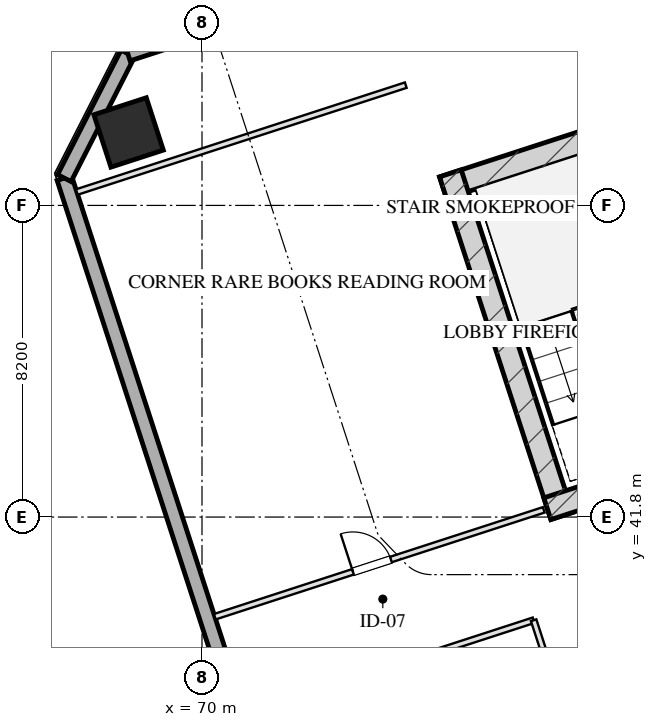
"""IFC4 building model, lengths in metres.
Left out: names, types, materials, properties, quantities, classifications, styles, units other than length and angle.
Written with IfcOpenShell. Run it as: python <this file> out.ifc"""

import sys

from ifc_helpers import new_model, si_unit, direction, frame, frame_2d, origin, origin_2d, place, context, subcontext, project, spatial, rectangle, hollow_rectangle, extrude, element, fill, save


model = new_model("IFC4")
c1 = context("Model", 3, precision=1e-05, world=origin(), true_north=direction((0.0, 1.0)))
c2 = subcontext(c1, "Body", "Model", "MODEL_VIEW")
j1 = project(units=[si_unit("LENGTHUNIT", "METRE"), si_unit("PLANEANGLEUNIT", "RADIAN")], contexts=[c1])
p1 = place(None, origin())
s1 = spatial("IfcSite", under=j1, at=p1, CompositionType="ELEMENT")
p2 = place(p1, origin())
s2 = spatial("IfcBuilding", under=s1, at=p2, CompositionType="ELEMENT")
p3 = place(p2, frame((0.0, 0.0, 96.6)))
s3 = spatial("IfcBuildingStorey", under=s2, at=p3, CompositionType="ELEMENT", Elevation=96.6)
p4 = place(p3, frame((76.344, 50.466, 0.0), z_axis=(0.0, 0.0, 1.0), x_axis=(0.951055727519, 0.309019421968, 0.0)))
e1 = element("IfcWall", 1, at=p4, inside=s3, PredefinedType="SHEAR", context=c2, shape_type="SweptSolid", body=[
    extrude(rectangle(XDim=16.4, YDim=0.6, at=frame_2d((8.2, 0.0))), origin(), (0.0, 0.0, 1.0), 3.45),
])
p5 = place(p3, frame((79.466, 41.828, 0.0), z_axis=(0.0, 0.0, 1.0), x_axis=(-0.309041232772, 0.951048640421, 0.0)))
e2 = element("IfcWall", 2, at=p5, inside=s3, PredefinedType="SHEAR", context=c2, shape_type="SweptSolid", body=[
    extrude(rectangle(XDim=9.48, YDim=0.6, at=frame_2d((4.74, 0.0))), origin(), (0.0, 0.0, 1.0), 3.45),
])
p6 = place(p3, frame((79.087, 42.021, 0.0), z_axis=(0.0, 0.0, 1.0), x_axis=(0.951062550203, 0.3089984233, 0.0)))
e3 = element("IfcWall", 3, at=p6, inside=s3, PredefinedType="SHEAR", context=c2, shape_type="SweptSolid", body=[
    extrude(rectangle(XDim=4.22, YDim=0.6, at=frame_2d((2.11, 0.0))), origin(), (0.0, 0.0, 1.0), 3.45),
])
p7 = place(p3, frame((68.069, 51.92, 0.0), z_axis=(0.0, 0.0, 1.0), x_axis=(0.951056516295, 0.309016994375, 0.0)))
e4 = element("IfcColumn", 4, at=p7, inside=s3, PredefinedType="COLUMN", context=c2, shape_type="SweptSolid", body=[
    extrude(hollow_rectangle(XDim=1.45, YDim=1.45, WallThickness=0.05, at=origin_2d()), origin(), (0.0, 0.0, 1.0), 3.451),
])
p8 = place(p3, frame((80.716, 6.59, 0.0), z_axis=(0.0, 0.0, 1.0), x_axis=(-0.309017542002, 0.95105633836, 0.0)))
e5 = element("IfcWall", 5, at=p8, inside=s3, PredefinedType="SOLIDWALL", context=c2, shape_type="SweptSolid", body=[
    extrude(rectangle(XDim=46.4, YDim=0.4, at=frame_2d((23.2, 0.0))), origin(), (0.0, 0.0, 1.0), 2.55),
])
p9 = place(p8, frame((15.6, 0.0, 0.75)))
e6 = element("IfcOpeningElement", 6, at=p9, cuts=e5, PredefinedType="OPENING", context=c2, shape_type="SweptSolid", body=[
    extrude(rectangle(XDim=2.4, YDim=1.4, at=frame_2d((1.2, 0.7))), frame((0.0, 0.21, 0.0), z_axis=(0.0, -1.0, 0.0), x_axis=(1.0, 0.0, 0.0)), (0.0, 0.0, 1.0), 0.42),
])
p10 = place(p8, frame((19.4, 0.0, 0.75)))
e7 = element("IfcOpeningElement", 7, at=p10, cuts=e5, PredefinedType="OPENING", context=c2, shape_type="SweptSolid", body=[
    extrude(rectangle(XDim=2.4, YDim=1.4, at=frame_2d((1.2, 0.7))), frame((0.0, 0.21, 0.0), z_axis=(0.0, -1.0, 0.0), x_axis=(1.0, 0.0, 0.0)), (0.0, 0.0, 1.0), 0.42),
])
p11 = place(p8, frame((24.6, 0.0, 0.75)))
e8 = element("IfcOpeningElement", 8, at=p11, cuts=e5, PredefinedType="OPENING", context=c2, shape_type="SweptSolid", body=[
    extrude(rectangle(XDim=2.4, YDim=1.4, at=frame_2d((1.2, 0.7))), frame((0.0, 0.21, 0.0), z_axis=(0.0, -1.0, 0.0), x_axis=(1.0, 0.0, 0.0)), (0.0, 0.0, 1.0), 0.42),
])
p12 = place(p8, frame((28.4, 0.0, 0.75)))
e9 = element("IfcOpeningElement", 9, at=p12, cuts=e5, PredefinedType="OPENING", context=c2, shape_type="SweptSolid", body=[
    extrude(rectangle(XDim=2.4, YDim=1.4, at=frame_2d((1.2, 0.7))), frame((0.0, 0.21, 0.0), z_axis=(0.0, -1.0, 0.0), x_axis=(1.0, 0.0, 0.0)), (0.0, 0.0, 1.0), 0.42),
])
p13 = place(p3, frame((66.377, 50.719, 0.0), z_axis=(0.0, 0.0, 1.0), x_axis=(0.454026238093, 0.890988313685, 0.0)))
e10 = element("IfcWall", 10, at=p13, inside=s3, PredefinedType="SOLIDWALL", context=c2, shape_type="SweptSolid", body=[
    extrude(rectangle(XDim=3.677, YDim=0.4, at=frame_2d((1.838, 0.0))), origin(), (0.0, 0.0, 1.0), 2.55),
])
p14 = place(p3, frame((68.047, 53.995, 0.0), z_axis=(0.0, 0.0, 1.0), x_axis=(0.95105505922, 0.309021478754, 0.0)))
e11 = element("IfcWall", 11, at=p14, inside=s3, PredefinedType="SOLIDWALL", context=c2, shape_type="SweptSolid", body=[
    extrude(rectangle(XDim=29.4, YDim=0.4, at=frame_2d((14.7, 0.0))), origin(), (0.0, 0.0, 1.0), 2.55),
])
p15 = place(p3, frame((66.707, 50.352, 0.0), z_axis=(0.0, 0.0, 1.0), x_axis=(0.951057133767, 0.309015093986, 0.0)))
e12 = element("IfcWall", 12, at=p15, inside=s3, PredefinedType="PARTITIONING", context=c2, shape_type="SweptSolid", body=[
    extrude(rectangle(XDim=9.1, YDim=0.15, at=frame_2d((4.55, 0.0))), origin(), (0.0, 0.0, 1.0), 3.155),
])
p16 = place(p3, frame((70.338, 39.177, 0.0), z_axis=(0.0, 0.0, 1.0), x_axis=(0.951059695568, 0.309007209409, 0.0)))
e13 = element("IfcWall", 13, at=p16, inside=s3, PredefinedType="PARTITIONING", context=c2, shape_type="SweptSolid", body=[
    extrude(rectangle(XDim=9.1, YDim=0.15, at=frame_2d((4.55, 0.0))), origin(), (0.0, 0.0, 1.0), 3.155),
])
p17 = place(p16, frame((3.822, 0.0, 0.0)))
e14 = element("IfcOpeningElement", 14, at=p17, cuts=e13, PredefinedType="OPENING", context=c2, shape_type="SweptSolid", body=[
    extrude(rectangle(XDim=1.05, YDim=2.05, at=frame_2d((0.525, 1.025))), frame((0.0, 0.085, 0.0), z_axis=(0.0, -1.0, 0.0), x_axis=(1.0, 0.0, 0.0)), (0.0, 0.0, 1.0), 0.17),
])
p18 = place(p3, frame((71.166, 36.629, 0.0), z_axis=(0.0, 0.0, 1.0), x_axis=(0.951060470027, 0.309004825775, 0.0)))
e15 = element("IfcWall", 15, at=p18, inside=s3, PredefinedType="PARTITIONING", context=c2, shape_type="SweptSolid", body=[
    extrude(rectangle(XDim=7.95, YDim=0.15, at=frame_2d((3.975, 0.0))), origin(), (0.0, 0.0, 1.0), 3.155),
])
p19 = place(p3, frame((83.869, 23.26, 0.0), z_axis=(0.0, 0.0, 1.0), x_axis=(-0.309022042254, 0.951054876125, 0.0)))
e16 = element("IfcWall", 16, at=p19, inside=s3, PredefinedType="PARTITIONING", context=c2, shape_type="SweptSolid", body=[
    extrude(rectangle(XDim=16.64, YDim=0.15, at=frame_2d((8.32, 0.0))), origin(), (0.0, 0.0, 1.0), 3.155),
])
p20 = place(p19, frame((1.58, 0.0, 0.0)))
e17 = element("IfcOpeningElement", 17, at=p20, cuts=e16, PredefinedType="OPENING", context=c2, shape_type="SweptSolid", body=[
    extrude(rectangle(XDim=1.0, YDim=2.05, at=frame_2d((0.5, 1.025))), frame((0.0, 0.085, 0.0), z_axis=(0.0, -1.0, 0.0), x_axis=(1.0, 0.0, 0.0)), (0.0, 0.0, 1.0), 0.17),
])
p21 = place(p19, frame((6.08, 0.0, 0.0)))
e18 = element("IfcOpeningElement", 18, at=p21, cuts=e16, PredefinedType="OPENING", context=c2, shape_type="SweptSolid", body=[
    extrude(rectangle(XDim=1.0, YDim=2.05, at=frame_2d((0.5, 1.025))), frame((0.0, 0.085, 0.0), z_axis=(0.0, -1.0, 0.0), x_axis=(1.0, 0.0, 0.0)), (0.0, 0.0, 1.0), 0.17),
])
p22 = place(p19, frame((10.406, 0.0, 0.0)))
e19 = element("IfcOpeningElement", 19, at=p22, cuts=e16, PredefinedType="OPENING", context=c2, shape_type="SweptSolid", body=[
    extrude(rectangle(XDim=1.0, YDim=2.05, at=frame_2d((0.5, 1.025))), frame((0.0, 0.085, 0.0), z_axis=(0.0, -1.0, 0.0), x_axis=(1.0, 0.0, 0.0)), (0.0, 0.0, 1.0), 0.17),
])
p23 = place(p19, frame((14.226, 0.0, 0.0)))
e20 = element("IfcOpeningElement", 20, at=p23, cuts=e16, PredefinedType="OPENING", context=c2, shape_type="SweptSolid", body=[
    extrude(rectangle(XDim=1.0, YDim=2.05, at=frame_2d((0.5, 1.025))), frame((0.0, 0.085, 0.0), z_axis=(0.0, -1.0, 0.0), x_axis=(1.0, 0.0, 0.0)), (0.0, 0.0, 1.0), 0.17),
])
p24 = place(p17, origin())
e21 = element("IfcDoor", 21, at=p24, inside=s3, OperationType="SINGLE_SWING_LEFT", PredefinedType="DOOR", context=c2, shape_type="SweptSolid", body=[
    extrude(rectangle(XDim=1.05, YDim=2.05, at=frame_2d((0.525, 1.025))), frame((0.0, 0.025, 0.0), z_axis=(0.0, -1.0, 0.0), x_axis=(1.0, 0.0, 0.0)), (0.0, 0.0, 1.0), 0.05),
])
fill(e14, e21)
save(model, sys.argv[1])
